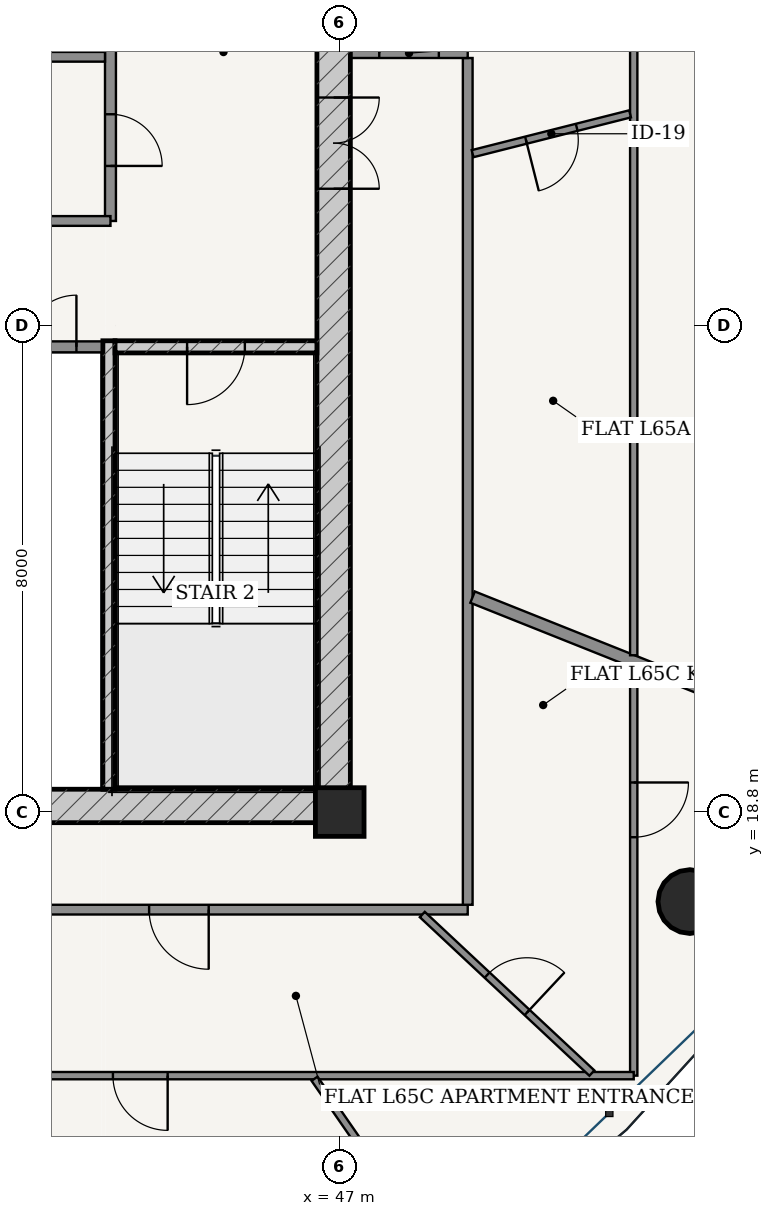
"""IFC4 building model, lengths in metres.
Left out: names, types, materials, properties, quantities, classifications, styles, units other than length and angle.
Written with IfcOpenShell. Run it as: python <this file> out.ifc"""

import sys

from ifc_helpers import new_model, si_unit, direction, frame, frame_2d, origin, origin_2d, place, context, subcontext, project, spatial, rectangle, hollow_circle, extrude, source, transform, mapped, element, fill, save


model = new_model("IFC4")
c1 = context("Model", 3, precision=1e-05, world=origin(), true_north=direction((-0.2419218956, 0.970295726276)))
c2 = subcontext(c1, "Body", "Model", "MODEL_VIEW")
j1 = project(units=[si_unit("LENGTHUNIT", "METRE"), si_unit("PLANEANGLEUNIT", "RADIAN")], contexts=[c1])
p1 = place(None, origin())
s1 = spatial("IfcSite", under=j1, at=p1, CompositionType="ELEMENT")
p2 = place(p1, origin())
s2 = spatial("IfcBuilding", under=s1, at=p2, CompositionType="ELEMENT")
p3 = place(p2, frame((0.0, 0.0, 248.2)))
s3 = spatial("IfcBuildingStorey", under=s2, at=p3, CompositionType="ELEMENT", Elevation=248.2)
p4 = place(p3, frame((47.0, 18.8, 0.0), z_axis=(0.0, 0.0, 1.0), x_axis=(1.0, 0.0, 0.0)))
e1 = element("IfcColumn", 1, at=p4, inside=s3, PredefinedType="COLUMN", context=c2, shape_type="SweptSolid", body=[
    extrude(rectangle(XDim=0.8, YDim=0.8, at=origin_2d()), origin(), (0.0, 0.0, 1.0), 3.75),
])
p5 = place(p3, frame((28.825, 18.9, 0.0), z_axis=(0.0, 0.0, 1.0), x_axis=(1.0, 0.0, 0.0)))
e2 = element("IfcWall", 2, at=p5, inside=s3, PredefinedType="SHEAR", context=c2, shape_type="SweptSolid", body=[
    extrude(rectangle(XDim=18.35, YDim=0.55, at=frame_2d((9.175, 0.0))), origin(), (0.0, 0.0, 1.0), 3.49),
])
p6 = place(p5, frame((7.41, 0.0, 0.0)))
e3 = element("IfcOpeningElement", 3, at=p6, cuts=e2, PredefinedType="OPENING", context=c2, shape_type="SweptSolid", body=[
    extrude(rectangle(XDim=0.85, YDim=2.1, at=frame_2d((0.425, 1.05))), frame((0.0, 0.285, 0.0), z_axis=(0.0, -1.0, 0.0), x_axis=(1.0, 0.0, 0.0)), (0.0, 0.0, 1.0), 0.57),
])
p7 = place(p5, frame((10.49, 0.0, 0.0)))
e4 = element("IfcOpeningElement", 4, at=p7, cuts=e2, PredefinedType="OPENING", context=c2, shape_type="SweptSolid", body=[
    extrude(rectangle(XDim=0.85, YDim=2.1, at=frame_2d((0.425, 1.05))), frame((0.0, 0.285, 0.0), z_axis=(0.0, -1.0, 0.0), x_axis=(1.0, 0.0, 0.0)), (0.0, 0.0, 1.0), 0.57),
])
p8 = place(p3, frame((46.9, 19.175, 0.0), z_axis=(0.0, 0.0, 1.0), x_axis=(0.0, 1.0, 0.0)))
e5 = element("IfcWall", 5, at=p8, inside=s3, PredefinedType="SHEAR", context=c2, shape_type="SweptSolid", body=[
    extrude(rectangle(XDim=15.25, YDim=0.55, at=frame_2d((7.625, 0.0))), origin(), (0.0, 0.0, 1.0), 3.49),
])
p9 = place(p8, frame((9.875, 0.0, 0.0)))
e6 = element("IfcOpeningElement", 6, at=p9, cuts=e5, PredefinedType="OPENING", context=c2, shape_type="SweptSolid", body=[
    extrude(rectangle(XDim=1.5, YDim=2.2, at=frame_2d((0.75, 1.1))), frame((0.0, 0.285, 0.0), z_axis=(0.0, -1.0, 0.0), x_axis=(1.0, 0.0, 0.0)), (0.0, 0.0, 1.0), 0.57),
])
p10 = place(p3, frame((43.205, 19.175, 0.0), z_axis=(0.0, 0.0, 1.0), x_axis=(0.0, 1.0, 0.0)))
e7 = element("IfcWall", 7, at=p10, inside=s3, PredefinedType="SOLIDWALL", context=c2, shape_type="SweptSolid", body=[
    extrude(rectangle(XDim=7.375, YDim=0.2, at=frame_2d((3.688, 0.0))), origin(), (0.0, 0.0, 1.0), 3.49),
])
p11 = place(p3, frame((43.305, 26.45, 0.0), z_axis=(0.0, 0.0, 1.0), x_axis=(1.0, 0.0, 0.0)))
e8 = element("IfcWall", 8, at=p11, inside=s3, PredefinedType="SOLIDWALL", context=c2, shape_type="SweptSolid", body=[
    extrude(rectangle(XDim=3.32, YDim=0.2, at=frame_2d((1.66, 0.0))), origin(), (0.0, 0.0, 1.0), 3.49),
])
p12 = place(p11, frame((1.185, 0.0, 0.0)))
e9 = element("IfcOpeningElement", 9, at=p12, cuts=e8, PredefinedType="OPENING", context=c2, shape_type="SweptSolid", body=[
    extrude(rectangle(XDim=0.95, YDim=2.15, at=frame_2d((0.475, 1.075))), frame((0.0, 0.11, 0.0), z_axis=(0.0, -1.0, 0.0), x_axis=(1.0, 0.0, 0.0)), (0.0, 0.0, 1.0), 0.22),
])
p13 = place(p3, frame((52.759, 17.328, 0.0), z_axis=(0.0, 0.0, 1.0), x_axis=(1.0, 0.0, 0.0)))
e10 = element("IfcColumn", 10, at=p13, inside=s3, PredefinedType="COLUMN", context=c2, shape_type="SweptSolid", body=[
    extrude(hollow_circle(Radius=0.525, WallThickness=0.035, at=origin_2d()), origin(), (0.0, 0.0, 1.0), 3.75),
])
p14 = place(p3, frame((41.39, 26.45, 0.0), z_axis=(0.0, 0.0, 1.0), x_axis=(1.0, 0.0, 0.0)))
e11 = element("IfcWall", 11, at=p14, inside=s3, PredefinedType="PARTITIONING", context=c2, shape_type="SweptSolid", body=[
    extrude(rectangle(XDim=1.71, YDim=0.18, at=frame_2d((0.855, 0.0))), origin(), (0.0, 0.0, 1.0), 3.49),
])
p15 = place(p14, frame((0.43, 0.0, 0.0)))
e12 = element("IfcOpeningElement", 12, at=p15, cuts=e11, PredefinedType="OPENING", context=c2, shape_type="SweptSolid", body=[
    extrude(rectangle(XDim=0.85, YDim=2.1, at=frame_2d((0.425, 1.05))), frame((0.0, 0.1, 0.0), z_axis=(0.0, -1.0, 0.0), x_axis=(1.0, 0.0, 0.0)), (0.0, 0.0, 1.0), 0.2),
])
p16 = place(p3, frame((43.23, 28.52, 0.0), z_axis=(0.0, 0.0, 1.0), x_axis=(0.0, 1.0, 0.0)))
e13 = element("IfcWall", 13, at=p16, inside=s3, PredefinedType="PARTITIONING", context=c2, shape_type="SweptSolid", body=[
    extrude(rectangle(XDim=5.905, YDim=0.18, at=frame_2d((2.953, 0.0))), origin(), (0.0, 0.0, 1.0), 3.49),
])
p17 = place(p16, frame((0.905, 0.0, 0.0)))
e14 = element("IfcOpeningElement", 14, at=p17, cuts=e13, PredefinedType="OPENING", context=c2, shape_type="SweptSolid", body=[
    extrude(rectangle(XDim=0.85, YDim=2.1, at=frame_2d((0.425, 1.05))), frame((0.0, 0.1, 0.0), z_axis=(0.0, -1.0, 0.0), x_axis=(1.0, 0.0, 0.0)), (0.0, 0.0, 1.0), 0.2),
])
p18 = place(p16, frame((3.655, 0.0, 0.0)))
e15 = element("IfcOpeningElement", 15, at=p18, cuts=e13, PredefinedType="OPENING", context=c2, shape_type="SweptSolid", body=[
    extrude(rectangle(XDim=1.15, YDim=2.2, at=frame_2d((0.575, 1.1))), frame((0.0, 0.1, 0.0), z_axis=(0.0, -1.0, 0.0), x_axis=(1.0, 0.0, 0.0)), (0.0, 0.0, 1.0), 0.2),
])
p19 = place(p3, frame((41.39, 31.22, 0.0), z_axis=(0.0, 0.0, 1.0), x_axis=(1.0, 0.0, 0.0)))
e16 = element("IfcWall", 16, at=p19, inside=s3, PredefinedType="PARTITIONING", context=c2, shape_type="SweptSolid", body=[
    extrude(rectangle(XDim=1.75, YDim=0.16, at=frame_2d((0.875, 0.0))), origin(), (0.0, 0.0, 1.0), 3.49),
])
p20 = place(p3, frame((41.39, 28.52, 0.0), z_axis=(0.0, 0.0, 1.0), x_axis=(1.0, 0.0, 0.0)))
e17 = element("IfcWall", 17, at=p20, inside=s3, PredefinedType="PARTITIONING", context=c2, shape_type="SweptSolid", body=[
    extrude(rectangle(XDim=1.84, YDim=0.16, at=frame_2d((0.92, 0.0))), origin(), (0.0, 0.0, 1.0), 3.49),
])
p21 = place(p3, frame((26.895, 17.195, 0.0), z_axis=(0.0, 0.0, 1.0), x_axis=(1.0, 0.0, 0.0)))
e18 = element("IfcWall", 18, at=p21, inside=s3, PredefinedType="PARTITIONING", context=c2, shape_type="SweptSolid", body=[
    extrude(rectangle(XDim=22.21, YDim=0.16, at=frame_2d((11.105, 0.0))), origin(), (0.0, 0.0, 1.0), 3.015),
])
p22 = place(p21, frame((2.861, 0.0, 0.0)))
e19 = element("IfcOpeningElement", 19, at=p22, cuts=e18, PredefinedType="OPENING", context=c2, shape_type="SweptSolid", body=[
    extrude(rectangle(XDim=0.98, YDim=2.2, at=frame_2d((0.49, 1.1))), frame((0.0, 0.09, 0.0), z_axis=(0.0, -1.0, 0.0), x_axis=(1.0, 0.0, 0.0)), (0.0, 0.0, 1.0), 0.18),
])
p23 = place(p21, frame((16.97, 0.0, 0.0)))
e20 = element("IfcOpeningElement", 20, at=p23, cuts=e18, PredefinedType="OPENING", context=c2, shape_type="SweptSolid", body=[
    extrude(rectangle(XDim=0.98, YDim=2.2, at=frame_2d((0.49, 1.1))), frame((0.0, 0.09, 0.0), z_axis=(0.0, -1.0, 0.0), x_axis=(1.0, 0.0, 0.0)), (0.0, 0.0, 1.0), 0.18),
])
p24 = place(p3, frame((49.105, 17.275, 0.0), z_axis=(0.0, 0.0, 1.0), x_axis=(0.0, 1.0, 0.0)))
e21 = element("IfcWall", 21, at=p24, inside=s3, PredefinedType="PARTITIONING", context=c2, shape_type="SweptSolid", body=[
    extrude(rectangle(XDim=13.925, YDim=0.16, at=frame_2d((6.962, 0.0))), origin(), (0.0, 0.0, 1.0), 3.015),
])
p25 = place(p3, frame((47.175, 31.28, 0.0), z_axis=(0.0, 0.0, 1.0), x_axis=(1.0, 0.0, 0.0)))
e22 = element("IfcWall", 22, at=p25, inside=s3, PredefinedType="PARTITIONING", context=c2, shape_type="SweptSolid", body=[
    extrude(rectangle(XDim=1.93, YDim=0.16, at=frame_2d((0.965, 0.0))), origin(), (0.0, 0.0, 1.0), 3.49),
])
p26 = place(p25, frame((0.475, 0.0, 0.0)))
e23 = element("IfcOpeningElement", 23, at=p26, cuts=e22, PredefinedType="OPENING", context=c2, shape_type="SweptSolid", body=[
    extrude(rectangle(XDim=0.98, YDim=2.2, at=frame_2d((0.49, 1.1))), frame((0.0, 0.09, 0.0), z_axis=(0.0, -1.0, 0.0), x_axis=(1.0, 0.0, 0.0)), (0.0, 0.0, 1.0), 0.18),
])
p27 = place(p3, frame((49.185, 22.334, 0.0), z_axis=(0.0, 0.0, 1.0), x_axis=(0.928710518269, -0.370805573389, 0.0)))
e24 = element("IfcWall", 24, at=p27, inside=s3, PredefinedType="PARTITIONING", context=c2, shape_type="SweptSolid", body=[
    extrude(rectangle(XDim=7.195, YDim=0.2, at=frame_2d((3.598, 0.0))), origin(), (0.0, 0.0, 1.0), 3.121),
])
p28 = place(p3, frame((51.835, 34.01, 0.0), z_axis=(0.0, 0.0, 1.0), x_axis=(0.0, -1.0, 0.0)))
e25 = element("IfcWall", 25, at=p28, inside=s3, PredefinedType="PARTITIONING", context=c2, shape_type="SweptSolid", body=[
    extrude(rectangle(XDim=12.632, YDim=0.12, at=frame_2d((6.316, 0.0))), origin(), (0.0, 0.0, 1.0), 3.015),
])
p29 = place(p28, frame((1.57, 0.0, 0.0)))
e26 = element("IfcOpeningElement", 26, at=p29, cuts=e25, PredefinedType="OPENING", context=c2, shape_type="SweptSolid", body=[
    extrude(rectangle(XDim=0.9, YDim=2.15, at=frame_2d((0.45, 1.075))), frame((0.0, 0.07, 0.0), z_axis=(0.0, -1.0, 0.0), x_axis=(1.0, 0.0, 0.0)), (0.0, 0.0, 1.0), 0.14),
])
p30 = place(p3, frame((49.185, 29.627, 0.0), z_axis=(0.0, 0.0, 1.0), x_axis=(0.969515658159, 0.2450293627, 0.0)))
e27 = element("IfcWall", 27, at=p30, inside=s3, PredefinedType="PARTITIONING", context=c2, shape_type="SweptSolid", body=[
    extrude(rectangle(XDim=2.671, YDim=0.12, at=frame_2d((1.336, 0.0))), origin(), (0.0, 0.0, 1.0), 3.209),
])
p31 = place(p30, frame((0.906, 0.0, 0.0)))
e28 = element("IfcOpeningElement", 28, at=p31, cuts=e27, PredefinedType="OPENING", context=c2, shape_type="SweptSolid", body=[
    extrude(rectangle(XDim=0.86, YDim=2.15, at=frame_2d((0.43, 1.075))), frame((0.0, 0.07, 0.0), z_axis=(0.0, -1.0, 0.0), x_axis=(1.0, 0.0, 0.0)), (0.0, 0.0, 1.0), 0.14),
])
p32 = place(p3, frame((51.835, 21.174, 0.0), z_axis=(0.0, 0.0, 1.0), x_axis=(0.0, -1.0, 0.0)))
e29 = element("IfcWall", 29, at=p32, inside=s3, PredefinedType="PARTITIONING", context=c2, shape_type="SweptSolid", body=[
    extrude(rectangle(XDim=6.709, YDim=0.12, at=frame_2d((3.354, 0.0))), origin(), (0.0, 0.0, 1.0), 3.015),
])
p33 = place(p32, frame((1.888, 0.0, 0.0)))
e30 = element("IfcOpeningElement", 30, at=p33, cuts=e29, PredefinedType="OPENING", context=c2, shape_type="SweptSolid", body=[
    extrude(rectangle(XDim=0.9, YDim=2.15, at=frame_2d((0.45, 1.075))), frame((0.0, 0.07, 0.0), z_axis=(0.0, -1.0, 0.0), x_axis=(1.0, 0.0, 0.0)), (0.0, 0.0, 1.0), 0.14),
])
p34 = place(p3, frame((51.835, 14.465, 0.0), z_axis=(0.0, 0.0, 1.0), x_axis=(-1.0, 0.0, 0.0)))
e31 = element("IfcWall", 31, at=p34, inside=s3, PredefinedType="PARTITIONING", context=c2, shape_type="SweptSolid", body=[
    extrude(rectangle(XDim=16.278, YDim=0.12, at=frame_2d((8.139, 0.0))), origin(), (0.0, 0.0, 1.0), 3.015),
])
p35 = place(p34, frame((7.665, 0.0, 0.0)))
e32 = element("IfcOpeningElement", 32, at=p35, cuts=e31, PredefinedType="OPENING", context=c2, shape_type="SweptSolid", body=[
    extrude(rectangle(XDim=0.9, YDim=2.15, at=frame_2d((0.45, 1.075))), frame((0.0, 0.07, 0.0), z_axis=(0.0, -1.0, 0.0), x_axis=(1.0, 0.0, 0.0)), (0.0, 0.0, 1.0), 0.14),
])
p36 = place(p3, frame((46.586, 14.414, 0.0), z_axis=(0.0, 0.0, 1.0), x_axis=(0.569657021681, -0.821882520589, 0.0)))
e33 = element("IfcWall", 33, at=p36, inside=s3, PredefinedType="PARTITIONING", context=c2, shape_type="SweptSolid", body=[
    extrude(rectangle(XDim=3.748, YDim=0.12, at=frame_2d((1.874, 0.0))), origin(), (0.0, 0.0, 1.0), 3.015),
])
p37 = place(p3, frame((48.358, 17.115, 0.0), z_axis=(0.0, 0.0, 1.0), x_axis=(0.730431927487, -0.682985504464, 0.0)))
e34 = element("IfcWall", 34, at=p37, inside=s3, PredefinedType="PARTITIONING", context=c2, shape_type="SweptSolid", body=[
    extrude(rectangle(XDim=3.818, YDim=0.12, at=frame_2d((1.909, 0.0))), origin(), (0.0, 0.0, 1.0), 3.121),
])
p38 = place(p37, frame((1.459, 0.0, 0.0)))
e35 = element("IfcOpeningElement", 35, at=p38, cuts=e34, PredefinedType="OPENING", context=c2, shape_type="SweptSolid", body=[
    extrude(rectangle(XDim=0.9, YDim=2.15, at=frame_2d((0.45, 1.075))), frame((0.0, 0.07, 0.0), z_axis=(0.0, -1.0, 0.0), x_axis=(1.0, 0.0, 0.0)), (0.0, 0.0, 1.0), 0.14),
])
m1 = source(origin(), c2, "Body", "SweptSolid", [
    extrude(rectangle(XDim=1.5, YDim=2.2, at=frame_2d((0.75, 1.1))), frame((0.0, 0.025, 0.0), z_axis=(0.0, -1.0, 0.0), x_axis=(1.0, 0.0, 0.0)), (0.0, 0.0, 1.0), 0.05),
])
p39 = place(p9, frame((1.5, 0.0, 0.0), z_axis=(0.0, 0.0, 1.0), x_axis=(-1.0, 0.0, 0.0)))
e36 = element("IfcDoor", 36, at=p39, inside=s3, OperationType="DOUBLE_DOOR_SINGLE_SWING", PredefinedType="DOOR", context=c2, shape_type="MappedRepresentation", body=[
    mapped(m1, transform((0.0, 0.0, 0.0), scale=1.0)),
])
fill(e6, e36)
m2 = source(origin(), c2, "Body", "SweptSolid", [
    extrude(rectangle(XDim=0.95, YDim=2.15, at=frame_2d((0.475, 1.075))), frame((0.0, 0.025, 0.0), z_axis=(0.0, -1.0, 0.0), x_axis=(1.0, 0.0, 0.0)), (0.0, 0.0, 1.0), 0.05),
])
p40 = place(p12, frame((0.95, 0.0, 0.0), z_axis=(0.0, 0.0, 1.0), x_axis=(-1.0, 0.0, 0.0)))
e37 = element("IfcDoor", 37, at=p40, inside=s3, OperationType="SINGLE_SWING_RIGHT", PredefinedType="DOOR", context=c2, shape_type="MappedRepresentation", body=[
    mapped(m2, transform((0.0, 0.0, 0.0), scale=1.0)),
])
fill(e9, e37)
m3 = source(origin(), c2, "Body", "SweptSolid", [
    extrude(rectangle(XDim=0.85, YDim=2.1, at=frame_2d((0.425, 1.05))), frame((0.0, 0.025, 0.0), z_axis=(0.0, -1.0, 0.0), x_axis=(1.0, 0.0, 0.0)), (0.0, 0.0, 1.0), 0.05),
])
p41 = place(p15, origin())
e38 = element("IfcDoor", 38, at=p41, inside=s3, OperationType="SINGLE_SWING_RIGHT", PredefinedType="DOOR", context=c2, shape_type="MappedRepresentation", body=[
    mapped(m3, transform((0.0, 0.0, 0.0), scale=1.0)),
])
fill(e12, e38)
p42 = place(p17, frame((0.85, 0.0, 0.0), z_axis=(0.0, 0.0, 1.0), x_axis=(-1.0, 0.0, 0.0)))
e39 = element("IfcDoor", 39, at=p42, inside=s3, OperationType="SINGLE_SWING_RIGHT", PredefinedType="DOOR", context=c2, shape_type="MappedRepresentation", body=[
    mapped(m3, transform((0.0, 0.0, 0.0), scale=1.0)),
])
fill(e14, e39)
m4 = source(origin(), c2, "Body", "SweptSolid", [
    extrude(rectangle(XDim=0.98, YDim=2.2, at=frame_2d((0.49, 1.1))), frame((0.0, 0.025, 0.0), z_axis=(0.0, -1.0, 0.0), x_axis=(1.0, 0.0, 0.0)), (0.0, 0.0, 1.0), 0.05),
])
p43 = place(p26, origin())
e40 = element("IfcDoor", 40, at=p43, inside=s3, OperationType="SINGLE_SWING_LEFT", PredefinedType="DOOR", context=c2, shape_type="MappedRepresentation", body=[
    mapped(m4, transform((0.0, 0.0, 0.0), scale=1.0)),
])
fill(e23, e40)
m5 = source(origin(), c2, "Body", "SweptSolid", [
    extrude(rectangle(XDim=0.86, YDim=2.15, at=frame_2d((0.43, 1.075))), frame((0.0, 0.025, 0.0), z_axis=(0.0, -1.0, 0.0), x_axis=(1.0, 0.0, 0.0)), (0.0, 0.0, 1.0), 0.05),
])
p44 = place(p31, frame((0.86, 0.0, 0.0), z_axis=(0.0, 0.0, 1.0), x_axis=(-1.0, 0.0, 0.0)))
e41 = element("IfcDoor", 41, at=p44, inside=s3, OperationType="SINGLE_SWING_RIGHT", PredefinedType="DOOR", context=c2, shape_type="MappedRepresentation", body=[
    mapped(m5, transform((0.0, 0.0, 0.0), scale=1.0)),
])
fill(e28, e41)
p45 = place(p23, frame((0.98, 0.0, 0.0), z_axis=(0.0, 0.0, 1.0), x_axis=(-1.0, 0.0, 0.0)))
e42 = element("IfcDoor", 42, at=p45, inside=s3, OperationType="SINGLE_SWING_LEFT", PredefinedType="DOOR", context=c2, shape_type="MappedRepresentation", body=[
    mapped(m4, transform((0.0, 0.0, 0.0), scale=1.0)),
])
fill(e20, e42)
m6 = source(origin(), c2, "Body", "SweptSolid", [
    extrude(rectangle(XDim=0.9, YDim=2.15, at=frame_2d((0.45, 1.075))), frame((0.0, 0.025, 0.0), z_axis=(0.0, -1.0, 0.0), x_axis=(1.0, 0.0, 0.0)), (0.0, 0.0, 1.0), 0.05),
])
p46 = place(p35, origin())
e43 = element("IfcDoor", 43, at=p46, inside=s3, OperationType="SINGLE_SWING_LEFT", PredefinedType="DOOR", context=c2, shape_type="MappedRepresentation", body=[
    mapped(m6, transform((0.0, 0.0, 0.0), scale=1.0)),
])
fill(e32, e43)
p47 = place(p38, origin())
e44 = element("IfcDoor", 44, at=p47, inside=s3, OperationType="SINGLE_SWING_RIGHT", PredefinedType="DOOR", context=c2, shape_type="MappedRepresentation", body=[
    mapped(m6, transform((0.0, 0.0, 0.0), scale=1.0)),
])
fill(e35, e44)
p48 = place(p33, origin())
e45 = element("IfcDoor", 45, at=p48, inside=s3, OperationType="SINGLE_SWING_LEFT", PredefinedType="DOOR", context=c2, shape_type="MappedRepresentation", body=[
    mapped(m6, transform((0.0, 0.0, 0.0), scale=1.0)),
])
fill(e30, e45)
save(model, sys.argv[1])
